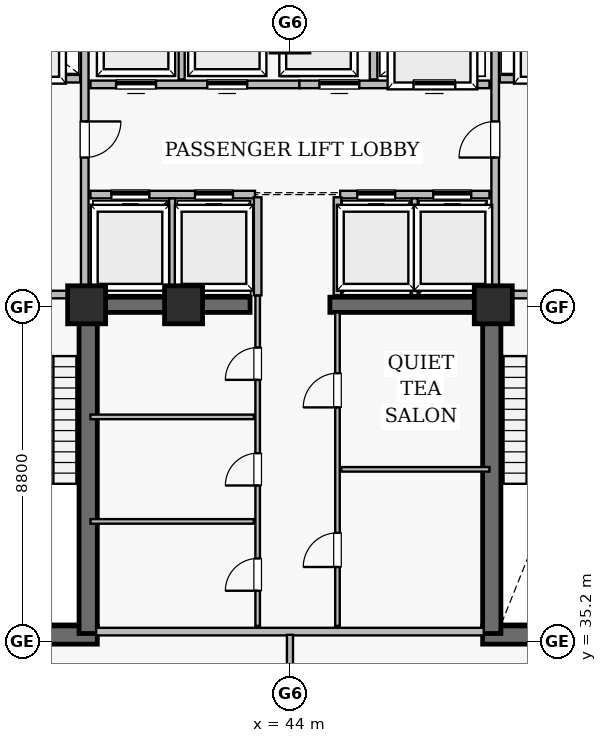
"""IFC4 building model, lengths in metres.
Left out: names, types, materials, properties, quantities, classifications, styles, units other than length and angle.
Written with IfcOpenShell. Run it as: python <this file> out.ifc"""

import sys

from ifc_helpers import new_model, si_unit, direction, frame, frame_2d, origin, origin_2d, place, context, subcontext, project, spatial, rectangle, extrude, element, fill, save


model = new_model("IFC4")
c1 = context("Model", 3, precision=1e-05, world=origin(), true_north=direction((0.0, 1.0)))
c2 = subcontext(c1, "Body", "Model", "MODEL_VIEW")
j1 = project(units=[si_unit("LENGTHUNIT", "METRE"), si_unit("PLANEANGLEUNIT", "RADIAN")], contexts=[c1])
p1 = place(None, origin())
s1 = spatial("IfcSite", under=j1, at=p1, CompositionType="ELEMENT")
p2 = place(p1, origin())
s2 = spatial("IfcBuilding", under=s1, at=p2, CompositionType="ELEMENT")
p3 = place(p2, frame((0.0, 0.0, 189.8)))
s3 = spatial("IfcBuildingStorey", under=s2, at=p3, CompositionType="ELEMENT", Elevation=189.8)
for number, where, z_axis, x_axis in (
    (1, (35.12, 35.36, 0.0), (0.0, 0.0, 1.0), (1.0, 0.0, 0.0)),
    (2, (49.07, 35.36, 0.0), (0.0, 0.0, 1.0), (1.0, 0.0, 0.0)),
):
    element("IfcWall", number, at=place(p3, frame(where, z_axis=z_axis, x_axis=x_axis)), inside=s3, PredefinedType="SHEAR", context=c2, shape_type="SweptSolid", body=[
        extrude(rectangle(XDim=3.81, YDim=0.48, at=frame_2d((1.905, 0.0))), origin(), (0.0, 0.0, 1.0), 4.345),
    ])
for number, where, z_axis, x_axis in (
    (3, (38.69, 35.4, 0.0), (0.0, 0.0, 1.0), (0.0, 1.0, 0.0)),
    (4, (49.31, 35.4, 0.0), (0.0, 0.0, 1.0), (0.0, 1.0, 0.0)),
):
    element("IfcWall", number, at=place(p3, frame(where, z_axis=z_axis, x_axis=x_axis)), inside=s3, PredefinedType="SHEAR", context=c2, shape_type="SweptSolid", body=[
        extrude(rectangle(XDim=8.95, YDim=0.48, at=frame_2d((4.475, 0.0))), origin(), (0.0, 0.0, 1.0), 4.345),
    ])
p4 = place(p3, frame((44.0, 50.1, 0.0), z_axis=(0.0, 0.0, 1.0), x_axis=(0.0, 1.0, 0.0)))
e5 = element("IfcWall", 5, at=p4, inside=s3, PredefinedType="SHEAR", context=c2, shape_type="SweptSolid", body=[
    extrude(rectangle(XDim=2.1, YDim=0.4, at=frame_2d((1.05, 0.0))), origin(), (0.0, 0.0, 1.0), 4.345),
])
for number, where, z_axis, x_axis in (
    (6, (38.75, 44.05, 0.0), (0.0, 0.0, 1.0), (1.0, 0.0, 0.0)),
    (7, (45.05, 44.05, 0.0), (0.0, 0.0, 1.0), (1.0, 0.0, 0.0)),
):
    element("IfcWall", number, at=place(p3, frame(where, z_axis=z_axis, x_axis=x_axis)), inside=s3, PredefinedType="SHEAR", context=c2, shape_type="SweptSolid", body=[
        extrude(rectangle(XDim=4.2, YDim=0.4, at=frame_2d((2.1, 0.0))), origin(), (0.0, 0.0, 1.0), 4.345),
    ])
for number, where, z_axis, x_axis in (
    (8, (38.65, 44.05, 0.0), (0.0, 0.0, 1.0), (1.0, 0.0, 0.0)),
    (9, (49.35, 44.05, 0.0), (0.0, 0.0, 1.0), (1.0, 0.0, 0.0)),
    (10, (41.2, 44.05, 0.0), (0.0, 0.0, 1.0), (1.0, 0.0, 0.0)),
):
    element("IfcColumn", number, at=place(p3, frame(where, z_axis=z_axis, x_axis=x_axis)), inside=s3, PredefinedType="COLUMN", context=c2, shape_type="SweptSolid", body=[
        extrude(rectangle(XDim=1.0, YDim=1.0, at=origin_2d()), origin(), (0.0, 0.0, 1.0), 4.6),
    ])
p5 = place(p3, frame((43.15, 35.6, 0.0), z_axis=(0.0, 0.0, 1.0), x_axis=(0.0, 1.0, 0.0)))
e11 = element("IfcWall", 11, at=p5, inside=s3, PredefinedType="PARTITIONING", context=c2, shape_type="SweptSolid", body=[
    extrude(rectangle(XDim=8.7, YDim=0.12, at=frame_2d((4.35, 0.0))), origin(), (0.0, 0.0, 1.0), 4.345),
])
p6 = place(p5, frame((0.925, 0.0, 0.0)))
e12 = element("IfcOpeningElement", 12, at=p6, cuts=e11, PredefinedType="OPENING", context=c2, shape_type="SweptSolid", body=[
    extrude(rectangle(XDim=0.85, YDim=2.1, at=frame_2d((0.425, 1.05))), frame((0.0, 0.07, 0.0), z_axis=(0.0, -1.0, 0.0), x_axis=(1.0, 0.0, 0.0)), (0.0, 0.0, 1.0), 0.14),
])
p7 = place(p5, frame((3.695, 0.0, 0.0)))
e13 = element("IfcOpeningElement", 13, at=p7, cuts=e11, PredefinedType="OPENING", context=c2, shape_type="SweptSolid", body=[
    extrude(rectangle(XDim=0.85, YDim=2.1, at=frame_2d((0.425, 1.05))), frame((0.0, 0.07, 0.0), z_axis=(0.0, -1.0, 0.0), x_axis=(1.0, 0.0, 0.0)), (0.0, 0.0, 1.0), 0.14),
])
p8 = place(p5, frame((6.475, 0.0, 0.0)))
e14 = element("IfcOpeningElement", 14, at=p8, cuts=e11, PredefinedType="OPENING", context=c2, shape_type="SweptSolid", body=[
    extrude(rectangle(XDim=0.85, YDim=2.1, at=frame_2d((0.425, 1.05))), frame((0.0, 0.07, 0.0), z_axis=(0.0, -1.0, 0.0), x_axis=(1.0, 0.0, 0.0)), (0.0, 0.0, 1.0), 0.14),
])
p9 = place(p3, frame((45.25, 35.6, 0.0), z_axis=(0.0, 0.0, 1.0), x_axis=(0.0, 1.0, 0.0)))
e15 = element("IfcWall", 15, at=p9, inside=s3, PredefinedType="PARTITIONING", context=c2, shape_type="SweptSolid", body=[
    extrude(rectangle(XDim=8.25, YDim=0.12, at=frame_2d((4.125, 0.0))), origin(), (0.0, 0.0, 1.0), 4.345),
])
p10 = place(p9, frame((1.55, 0.0, 0.0)))
e16 = element("IfcOpeningElement", 16, at=p10, cuts=e15, PredefinedType="OPENING", context=c2, shape_type="SweptSolid", body=[
    extrude(rectangle(XDim=0.9, YDim=2.1, at=frame_2d((0.45, 1.05))), frame((0.0, 0.07, 0.0), z_axis=(0.0, -1.0, 0.0), x_axis=(1.0, 0.0, 0.0)), (0.0, 0.0, 1.0), 0.14),
])
p11 = place(p9, frame((5.75, 0.0, 0.0)))
e17 = element("IfcOpeningElement", 17, at=p11, cuts=e15, PredefinedType="OPENING", context=c2, shape_type="SweptSolid", body=[
    extrude(rectangle(XDim=0.9, YDim=2.1, at=frame_2d((0.45, 1.05))), frame((0.0, 0.07, 0.0), z_axis=(0.0, -1.0, 0.0), x_axis=(1.0, 0.0, 0.0)), (0.0, 0.0, 1.0), 0.14),
])
p12 = place(p3, frame((38.6, 44.5, 0.0), z_axis=(0.0, 0.0, 1.0), x_axis=(0.0, 1.0, 0.0)))
e18 = element("IfcWall", 18, at=p12, inside=s3, PredefinedType="SOLIDWALL", context=c2, shape_type="SweptSolid", body=[
    extrude(rectangle(XDim=7.92, YDim=0.2, at=frame_2d((3.96, 0.0))), origin(), (0.0, 0.0, 1.0), 4.345),
])
p13 = place(p12, frame((3.425, 0.0, 0.0)))
e19 = element("IfcOpeningElement", 19, at=p13, cuts=e18, PredefinedType="OPENING", context=c2, shape_type="SweptSolid", body=[
    extrude(rectangle(XDim=0.95, YDim=2.15, at=frame_2d((0.475, 1.075))), frame((0.0, 0.11, 0.0), z_axis=(0.0, -1.0, 0.0), x_axis=(1.0, 0.0, 0.0)), (0.0, 0.0, 1.0), 0.22),
])
p14 = place(p3, frame((49.4, 44.5, 0.0), z_axis=(0.0, 0.0, 1.0), x_axis=(0.0, 1.0, 0.0)))
e20 = element("IfcWall", 20, at=p14, inside=s3, PredefinedType="SOLIDWALL", context=c2, shape_type="SweptSolid", body=[
    extrude(rectangle(XDim=7.92, YDim=0.2, at=frame_2d((3.96, 0.0))), origin(), (0.0, 0.0, 1.0), 3.433),
])
p15 = place(p14, frame((3.425, 0.0, 0.0)))
e21 = element("IfcOpeningElement", 21, at=p15, cuts=e20, PredefinedType="OPENING", context=c2, shape_type="SweptSolid", body=[
    extrude(rectangle(XDim=0.95, YDim=2.15, at=frame_2d((0.475, 1.075))), frame((0.0, 0.11, 0.0), z_axis=(0.0, -1.0, 0.0), x_axis=(1.0, 0.0, 0.0)), (0.0, 0.0, 1.0), 0.22),
])
p16 = place(p3, frame((38.75, 49.85, 0.0), z_axis=(0.0, 0.0, 1.0), x_axis=(1.0, 0.0, 0.0)))
e22 = element("IfcWall", 22, at=p16, inside=s3, PredefinedType="SOLIDWALL", context=c2, shape_type="SweptSolid", body=[
    extrude(rectangle(XDim=5.5, YDim=0.2, at=frame_2d((2.75, 0.0))), origin(), (0.0, 0.0, 1.0), 4.345),
])
p17 = place(p16, frame((0.675, 0.0, 0.0)))
e23 = element("IfcOpeningElement", 23, at=p17, cuts=e22, PredefinedType="OPENING", context=c2, shape_type="SweptSolid", body=[
    extrude(rectangle(XDim=1.05, YDim=2.15, at=frame_2d((0.525, 1.075))), frame((0.0, 0.11, 0.0), z_axis=(0.0, -1.0, 0.0), x_axis=(1.0, 0.0, 0.0)), (0.0, 0.0, 1.0), 0.22),
])
p18 = place(p16, frame((3.075, 0.0, 0.0)))
e24 = element("IfcOpeningElement", 24, at=p18, cuts=e22, PredefinedType="OPENING", context=c2, shape_type="SweptSolid", body=[
    extrude(rectangle(XDim=1.05, YDim=2.15, at=frame_2d((0.525, 1.075))), frame((0.0, 0.11, 0.0), z_axis=(0.0, -1.0, 0.0), x_axis=(1.0, 0.0, 0.0)), (0.0, 0.0, 1.0), 0.22),
])
p19 = place(p3, frame((44.25, 49.85, 0.0), z_axis=(0.0, 0.0, 1.0), x_axis=(1.0, 0.0, 0.0)))
e25 = element("IfcWall", 25, at=p19, inside=s3, PredefinedType="SOLIDWALL", context=c2, shape_type="SweptSolid", body=[
    extrude(rectangle(XDim=5.0, YDim=0.2, at=frame_2d((2.5, 0.0))), origin(), (0.0, 0.0, 1.0), 3.433),
])
p20 = place(p19, frame((0.525, 0.0, 0.0)))
e26 = element("IfcOpeningElement", 26, at=p20, cuts=e25, PredefinedType="OPENING", context=c2, shape_type="SweptSolid", body=[
    extrude(rectangle(XDim=1.05, YDim=2.15, at=frame_2d((0.525, 1.075))), frame((0.0, 0.11, 0.0), z_axis=(0.0, -1.0, 0.0), x_axis=(1.0, 0.0, 0.0)), (0.0, 0.0, 1.0), 0.22),
])
p21 = place(p19, frame((3.0, 0.0, 0.0)))
e27 = element("IfcOpeningElement", 27, at=p21, cuts=e25, PredefinedType="OPENING", context=c2, shape_type="SweptSolid", body=[
    extrude(rectangle(XDim=1.1, YDim=2.15, at=frame_2d((0.55, 1.075))), frame((0.0, 0.11, 0.0), z_axis=(0.0, -1.0, 0.0), x_axis=(1.0, 0.0, 0.0)), (0.0, 0.0, 1.0), 0.22),
])
p22 = place(p3, frame((38.75, 46.95, 0.0), z_axis=(0.0, 0.0, 1.0), x_axis=(1.0, 0.0, 0.0)))
e28 = element("IfcWall", 28, at=p22, inside=s3, PredefinedType="SOLIDWALL", context=c2, shape_type="SweptSolid", body=[
    extrude(rectangle(XDim=4.33, YDim=0.2, at=frame_2d((2.165, 0.0))), origin(), (0.0, 0.0, 1.0), 4.345),
])
p23 = place(p22, frame((0.55, 0.0, 0.0)))
e29 = element("IfcOpeningElement", 29, at=p23, cuts=e28, PredefinedType="OPENING", context=c2, shape_type="SweptSolid", body=[
    extrude(rectangle(XDim=1.0, YDim=2.15, at=frame_2d((0.5, 1.075))), frame((0.0, 0.11, 0.0), z_axis=(0.0, -1.0, 0.0), x_axis=(1.0, 0.0, 0.0)), (0.0, 0.0, 1.0), 0.22),
])
p24 = place(p22, frame((2.75, 0.0, 0.0)))
e30 = element("IfcOpeningElement", 30, at=p24, cuts=e28, PredefinedType="OPENING", context=c2, shape_type="SweptSolid", body=[
    extrude(rectangle(XDim=1.0, YDim=2.15, at=frame_2d((0.5, 1.075))), frame((0.0, 0.11, 0.0), z_axis=(0.0, -1.0, 0.0), x_axis=(1.0, 0.0, 0.0)), (0.0, 0.0, 1.0), 0.22),
])
p25 = place(p3, frame((45.32, 46.95, 0.0), z_axis=(0.0, 0.0, 1.0), x_axis=(1.0, 0.0, 0.0)))
e31 = element("IfcWall", 31, at=p25, inside=s3, PredefinedType="SOLIDWALL", context=c2, shape_type="SweptSolid", body=[
    extrude(rectangle(XDim=3.93, YDim=0.2, at=frame_2d((1.965, 0.0))), origin(), (0.0, 0.0, 1.0), 3.433),
])
p26 = place(p25, frame((0.45, 0.0, 0.0)))
e32 = element("IfcOpeningElement", 32, at=p26, cuts=e31, PredefinedType="OPENING", context=c2, shape_type="SweptSolid", body=[
    extrude(rectangle(XDim=1.0, YDim=2.15, at=frame_2d((0.5, 1.075))), frame((0.0, 0.11, 0.0), z_axis=(0.0, -1.0, 0.0), x_axis=(1.0, 0.0, 0.0)), (0.0, 0.0, 1.0), 0.22),
])
p27 = place(p25, frame((2.45, 0.0, 0.0)))
e33 = element("IfcOpeningElement", 33, at=p27, cuts=e31, PredefinedType="OPENING", context=c2, shape_type="SweptSolid", body=[
    extrude(rectangle(XDim=1.0, YDim=2.15, at=frame_2d((0.5, 1.075))), frame((0.0, 0.11, 0.0), z_axis=(0.0, -1.0, 0.0), x_axis=(1.0, 0.0, 0.0)), (0.0, 0.0, 1.0), 0.22),
])
p28 = place(p3, frame((35.65, 44.32, 0.0), z_axis=(0.0, 0.0, 1.0), x_axis=(1.0, 0.0, 0.0)))
e34 = element("IfcWall", 34, at=p28, inside=s3, PredefinedType="SOLIDWALL", context=c2, shape_type="SweptSolid", body=[
    extrude(rectangle(XDim=2.8, YDim=0.2, at=frame_2d((1.4, 0.0))), origin(), (0.0, 0.0, 1.0), 4.345),
])
p29 = place(p28, frame((0.9, 0.0, 0.0)))
e35 = element("IfcOpeningElement", 35, at=p29, cuts=e34, PredefinedType="OPENING", context=c2, shape_type="SweptSolid", body=[
    extrude(rectangle(XDim=1.0, YDim=2.15, at=frame_2d((0.5, 1.075))), frame((0.0, 0.11, 0.0), z_axis=(0.0, -1.0, 0.0), x_axis=(1.0, 0.0, 0.0)), (0.0, 0.0, 1.0), 0.22),
])
p30 = place(p3, frame((49.55, 44.32, 0.0), z_axis=(0.0, 0.0, 1.0), x_axis=(1.0, 0.0, 0.0)))
e36 = element("IfcWall", 36, at=p30, inside=s3, PredefinedType="SOLIDWALL", context=c2, shape_type="SweptSolid", body=[
    extrude(rectangle(XDim=2.8, YDim=0.2, at=frame_2d((1.4, 0.0))), origin(), (0.0, 0.0, 1.0), 3.433),
])
p31 = place(p30, frame((0.9, 0.0, 0.0)))
e37 = element("IfcOpeningElement", 37, at=p31, cuts=e36, PredefinedType="OPENING", context=c2, shape_type="SweptSolid", body=[
    extrude(rectangle(XDim=1.0, YDim=2.15, at=frame_2d((0.5, 1.075))), frame((0.0, 0.11, 0.0), z_axis=(0.0, -1.0, 0.0), x_axis=(1.0, 0.0, 0.0)), (0.0, 0.0, 1.0), 0.22),
])
p32 = place(p3, frame((35.68, 50.0, 0.0), z_axis=(0.0, 0.0, 1.0), x_axis=(1.0, 0.0, 0.0)))
e38 = element("IfcWall", 38, at=p32, inside=s3, PredefinedType="SOLIDWALL", context=c2, shape_type="SweptSolid", body=[
    extrude(rectangle(XDim=2.8, YDim=0.2, at=frame_2d((1.4, 0.0))), origin(), (0.0, 0.0, 1.0), 4.345),
])
p33 = place(p32, frame((0.85, 0.0, 0.0)))
e39 = element("IfcOpeningElement", 39, at=p33, cuts=e38, PredefinedType="OPENING", context=c2, shape_type="SweptSolid", body=[
    extrude(rectangle(XDim=1.1, YDim=2.15, at=frame_2d((0.55, 1.075))), frame((0.0, 0.11, 0.0), z_axis=(0.0, -1.0, 0.0), x_axis=(1.0, 0.0, 0.0)), (0.0, 0.0, 1.0), 0.22),
])
p34 = place(p3, frame((49.52, 50.0, 0.0), z_axis=(0.0, 0.0, 1.0), x_axis=(1.0, 0.0, 0.0)))
e40 = element("IfcWall", 40, at=p34, inside=s3, PredefinedType="SOLIDWALL", context=c2, shape_type="SweptSolid", body=[
    extrude(rectangle(XDim=2.8, YDim=0.2, at=frame_2d((1.4, 0.0))), origin(), (0.0, 0.0, 1.0), 4.345),
])
p35 = place(p34, frame((0.85, 0.0, 0.0)))
e41 = element("IfcOpeningElement", 41, at=p35, cuts=e40, PredefinedType="OPENING", context=c2, shape_type="SweptSolid", body=[
    extrude(rectangle(XDim=1.1, YDim=2.15, at=frame_2d((0.55, 1.075))), frame((0.0, 0.11, 0.0), z_axis=(0.0, -1.0, 0.0), x_axis=(1.0, 0.0, 0.0)), (0.0, 0.0, 1.0), 0.22),
])
p36 = place(p3, frame((38.9, 35.45, 0.0), z_axis=(0.0, 0.0, 1.0), x_axis=(1.0, 0.0, 0.0)))
e42 = element("IfcWall", 42, at=p36, inside=s3, PredefinedType="SOLIDWALL", context=c2, shape_type="SweptSolid", body=[
    extrude(rectangle(XDim=10.2, YDim=0.2, at=frame_2d((5.1, 0.0))), origin(), (0.0, 0.0, 1.0), 4.345),
])
p37 = place(p3, frame((44.0, 26.156, 0.0), z_axis=(0.0, 0.0, 1.0), x_axis=(0.0, 1.0, 0.0)))
e43 = element("IfcWall", 43, at=p37, inside=s3, PredefinedType="SOLIDWALL", context=c2, shape_type="SweptSolid", body=[
    extrude(rectangle(XDim=9.209, YDim=0.16, at=frame_2d((4.604, 0.0))), origin(), (0.0, 0.0, 1.0), 3.533),
])
for number, where, z_axis, x_axis in (
    (44, (38.75, 38.35, 0.0), (0.0, 0.0, 1.0), (1.0, 0.0, 0.0)),
    (45, (38.75, 41.1, 0.0), (0.0, 0.0, 1.0), (1.0, 0.0, 0.0)),
):
    element("IfcWall", number, at=place(p3, frame(where, z_axis=z_axis, x_axis=x_axis)), inside=s3, PredefinedType="PARTITIONING", context=c2, shape_type="SweptSolid", body=[
        extrude(rectangle(XDim=4.3, YDim=0.12, at=frame_2d((2.15, 0.0))), origin(), (0.0, 0.0, 1.0), 4.345),
    ])
p38 = place(p3, frame((45.35, 39.72, 0.0), z_axis=(0.0, 0.0, 1.0), x_axis=(1.0, 0.0, 0.0)))
e46 = element("IfcWall", 46, at=p38, inside=s3, PredefinedType="PARTITIONING", context=c2, shape_type="SweptSolid", body=[
    extrude(rectangle(XDim=3.9, YDim=0.12, at=frame_2d((1.95, 0.0))), origin(), (0.0, 0.0, 1.0), 4.345),
])
for number, where, z_axis, x_axis in (
    (47, (43.15, 44.3, 0.0), (0.0, 0.0, 1.0), (0.0, 1.0, 0.0)),
    (48, (45.25, 44.3, 0.0), (0.0, 0.0, 1.0), (0.0, 1.0, 0.0)),
):
    element("IfcWall", number, at=place(p3, frame(where, z_axis=z_axis, x_axis=x_axis)), inside=s3, PredefinedType="SOLIDWALL", context=c2, shape_type="SweptSolid", body=[
        extrude(rectangle(XDim=2.58, YDim=0.2, at=frame_2d((1.29, 0.0))), origin(), (0.0, 0.0, 1.0), 4.345),
    ])
p39 = place(p3, frame((40.9, 44.3, 0.0), z_axis=(0.0, 0.0, 1.0), x_axis=(0.0, 1.0, 0.0)))
e49 = element("IfcWall", 49, at=p39, inside=s3, PredefinedType="SOLIDWALL", context=c2, shape_type="SweptSolid", body=[
    extrude(rectangle(XDim=2.55, YDim=0.16, at=frame_2d((1.275, 0.0))), origin(), (0.0, 0.0, 1.0), 4.345),
])
p40 = place(p3, frame((47.28, 44.3, 0.0), z_axis=(0.0, 0.0, 1.0), x_axis=(0.0, 1.0, 0.0)))
e50 = element("IfcWall", 50, at=p40, inside=s3, PredefinedType="SOLIDWALL", context=c2, shape_type="SweptSolid", body=[
    extrude(rectangle(XDim=2.55, YDim=0.16, at=frame_2d((1.275, 0.0))), origin(), (0.0, 0.0, 1.0), 3.433),
])
p41 = place(p3, frame((41.15, 49.98, 0.0), z_axis=(0.0, 0.0, 1.0), x_axis=(0.0, 1.0, 0.0)))
e51 = element("IfcWall", 51, at=p41, inside=s3, PredefinedType="SOLIDWALL", context=c2, shape_type="SweptSolid", body=[
    extrude(rectangle(XDim=2.37, YDim=0.16, at=frame_2d((1.185, 0.0))), origin(), (0.0, 0.0, 1.0), 4.345),
])
p42 = place(p3, frame((46.2, 49.98, 0.0), z_axis=(0.0, 0.0, 1.0), x_axis=(0.0, 1.0, 0.0)))
e52 = element("IfcWall", 52, at=p42, inside=s3, PredefinedType="SOLIDWALL", context=c2, shape_type="SweptSolid", body=[
    extrude(rectangle(XDim=2.37, YDim=0.2, at=frame_2d((1.185, 0.0))), origin(), (0.0, 0.0, 1.0), 4.345),
])
p43 = place(p13, frame((0.95, 0.0, 0.0), z_axis=(0.0, 0.0, 1.0), x_axis=(-1.0, 0.0, 0.0)))
e53 = element("IfcDoor", 53, at=p43, inside=s3, OperationType="SINGLE_SWING_RIGHT", PredefinedType="DOOR", context=c2, shape_type="SweptSolid", body=[
    extrude(rectangle(XDim=0.95, YDim=2.15, at=frame_2d((0.475, 1.075))), frame((0.0, 0.025, 0.0), z_axis=(0.0, -1.0, 0.0), x_axis=(1.0, 0.0, 0.0)), (0.0, 0.0, 1.0), 0.05),
])
fill(e19, e53)
p44 = place(p15, origin())
e54 = element("IfcDoor", 54, at=p44, inside=s3, OperationType="SINGLE_SWING_LEFT", PredefinedType="DOOR", context=c2, shape_type="SweptSolid", body=[
    extrude(rectangle(XDim=0.95, YDim=2.15, at=frame_2d((0.475, 1.075))), frame((0.0, 0.025, 0.0), z_axis=(0.0, -1.0, 0.0), x_axis=(1.0, 0.0, 0.0)), (0.0, 0.0, 1.0), 0.05),
])
fill(e21, e54)
p45 = place(p17, origin())
e55 = element("IfcDoor", 55, at=p45, inside=s3, OperationType="SLIDING_TO_LEFT", PredefinedType="DOOR", context=c2, shape_type="SweptSolid", body=[
    extrude(rectangle(XDim=1.05, YDim=2.15, at=frame_2d((0.525, 1.075))), frame((0.0, 0.025, 0.0), z_axis=(0.0, -1.0, 0.0), x_axis=(1.0, 0.0, 0.0)), (0.0, 0.0, 1.0), 0.05),
])
fill(e23, e55)
p46 = place(p18, origin())
e56 = element("IfcDoor", 56, at=p46, inside=s3, OperationType="SLIDING_TO_LEFT", PredefinedType="DOOR", context=c2, shape_type="SweptSolid", body=[
    extrude(rectangle(XDim=1.05, YDim=2.15, at=frame_2d((0.525, 1.075))), frame((0.0, 0.025, 0.0), z_axis=(0.0, -1.0, 0.0), x_axis=(1.0, 0.0, 0.0)), (0.0, 0.0, 1.0), 0.05),
])
fill(e24, e56)
p47 = place(p20, origin())
e57 = element("IfcDoor", 57, at=p47, inside=s3, OperationType="SLIDING_TO_LEFT", PredefinedType="DOOR", context=c2, shape_type="SweptSolid", body=[
    extrude(rectangle(XDim=1.05, YDim=2.15, at=frame_2d((0.525, 1.075))), frame((0.0, 0.025, 0.0), z_axis=(0.0, -1.0, 0.0), x_axis=(1.0, 0.0, 0.0)), (0.0, 0.0, 1.0), 0.05),
])
fill(e26, e57)
p48 = place(p21, origin())
e58 = element("IfcDoor", 58, at=p48, inside=s3, OperationType="SLIDING_TO_LEFT", PredefinedType="DOOR", context=c2, shape_type="SweptSolid", body=[
    extrude(rectangle(XDim=1.1, YDim=2.15, at=frame_2d((0.55, 1.075))), frame((0.0, 0.025, 0.0), z_axis=(0.0, -1.0, 0.0), x_axis=(1.0, 0.0, 0.0)), (0.0, 0.0, 1.0), 0.05),
])
fill(e27, e58)
p49 = place(p23, origin())
e59 = element("IfcDoor", 59, at=p49, inside=s3, OperationType="SLIDING_TO_LEFT", PredefinedType="DOOR", context=c2, shape_type="SweptSolid", body=[
    extrude(rectangle(XDim=1.0, YDim=2.15, at=frame_2d((0.5, 1.075))), frame((0.0, 0.025, 0.0), z_axis=(0.0, -1.0, 0.0), x_axis=(1.0, 0.0, 0.0)), (0.0, 0.0, 1.0), 0.05),
])
fill(e29, e59)
p50 = place(p24, origin())
e60 = element("IfcDoor", 60, at=p50, inside=s3, OperationType="SLIDING_TO_LEFT", PredefinedType="DOOR", context=c2, shape_type="SweptSolid", body=[
    extrude(rectangle(XDim=1.0, YDim=2.15, at=frame_2d((0.5, 1.075))), frame((0.0, 0.025, 0.0), z_axis=(0.0, -1.0, 0.0), x_axis=(1.0, 0.0, 0.0)), (0.0, 0.0, 1.0), 0.05),
])
fill(e30, e60)
p51 = place(p26, origin())
e61 = element("IfcDoor", 61, at=p51, inside=s3, OperationType="SLIDING_TO_LEFT", PredefinedType="DOOR", context=c2, shape_type="SweptSolid", body=[
    extrude(rectangle(XDim=1.0, YDim=2.15, at=frame_2d((0.5, 1.075))), frame((0.0, 0.025, 0.0), z_axis=(0.0, -1.0, 0.0), x_axis=(1.0, 0.0, 0.0)), (0.0, 0.0, 1.0), 0.05),
])
fill(e32, e61)
p52 = place(p27, origin())
e62 = element("IfcDoor", 62, at=p52, inside=s3, OperationType="SLIDING_TO_LEFT", PredefinedType="DOOR", context=c2, shape_type="SweptSolid", body=[
    extrude(rectangle(XDim=1.0, YDim=2.15, at=frame_2d((0.5, 1.075))), frame((0.0, 0.025, 0.0), z_axis=(0.0, -1.0, 0.0), x_axis=(1.0, 0.0, 0.0)), (0.0, 0.0, 1.0), 0.05),
])
fill(e33, e62)
p53 = place(p6, origin())
e63 = element("IfcDoor", 63, at=p53, inside=s3, OperationType="SINGLE_SWING_LEFT", PredefinedType="DOOR", context=c2, shape_type="SweptSolid", body=[
    extrude(rectangle(XDim=0.85, YDim=2.1, at=frame_2d((0.425, 1.05))), frame((0.0, 0.025, 0.0), z_axis=(0.0, -1.0, 0.0), x_axis=(1.0, 0.0, 0.0)), (0.0, 0.0, 1.0), 0.05),
])
fill(e12, e63)
p54 = place(p7, origin())
e64 = element("IfcDoor", 64, at=p54, inside=s3, OperationType="SINGLE_SWING_LEFT", PredefinedType="DOOR", context=c2, shape_type="SweptSolid", body=[
    extrude(rectangle(XDim=0.85, YDim=2.1, at=frame_2d((0.425, 1.05))), frame((0.0, 0.025, 0.0), z_axis=(0.0, -1.0, 0.0), x_axis=(1.0, 0.0, 0.0)), (0.0, 0.0, 1.0), 0.05),
])
fill(e13, e64)
p55 = place(p8, origin())
e65 = element("IfcDoor", 65, at=p55, inside=s3, OperationType="SINGLE_SWING_LEFT", PredefinedType="DOOR", context=c2, shape_type="SweptSolid", body=[
    extrude(rectangle(XDim=0.85, YDim=2.1, at=frame_2d((0.425, 1.05))), frame((0.0, 0.025, 0.0), z_axis=(0.0, -1.0, 0.0), x_axis=(1.0, 0.0, 0.0)), (0.0, 0.0, 1.0), 0.05),
])
fill(e14, e65)
p56 = place(p10, origin())
e66 = element("IfcDoor", 66, at=p56, inside=s3, OperationType="SINGLE_SWING_LEFT", PredefinedType="DOOR", context=c2, shape_type="SweptSolid", body=[
    extrude(rectangle(XDim=0.9, YDim=2.1, at=frame_2d((0.45, 1.05))), frame((0.0, 0.025, 0.0), z_axis=(0.0, -1.0, 0.0), x_axis=(1.0, 0.0, 0.0)), (0.0, 0.0, 1.0), 0.05),
])
fill(e16, e66)
p57 = place(p11, origin())
e67 = element("IfcDoor", 67, at=p57, inside=s3, OperationType="SINGLE_SWING_LEFT", PredefinedType="DOOR", context=c2, shape_type="SweptSolid", body=[
    extrude(rectangle(XDim=0.9, YDim=2.1, at=frame_2d((0.45, 1.05))), frame((0.0, 0.025, 0.0), z_axis=(0.0, -1.0, 0.0), x_axis=(1.0, 0.0, 0.0)), (0.0, 0.0, 1.0), 0.05),
])
fill(e17, e67)
save(model, sys.argv[1])
